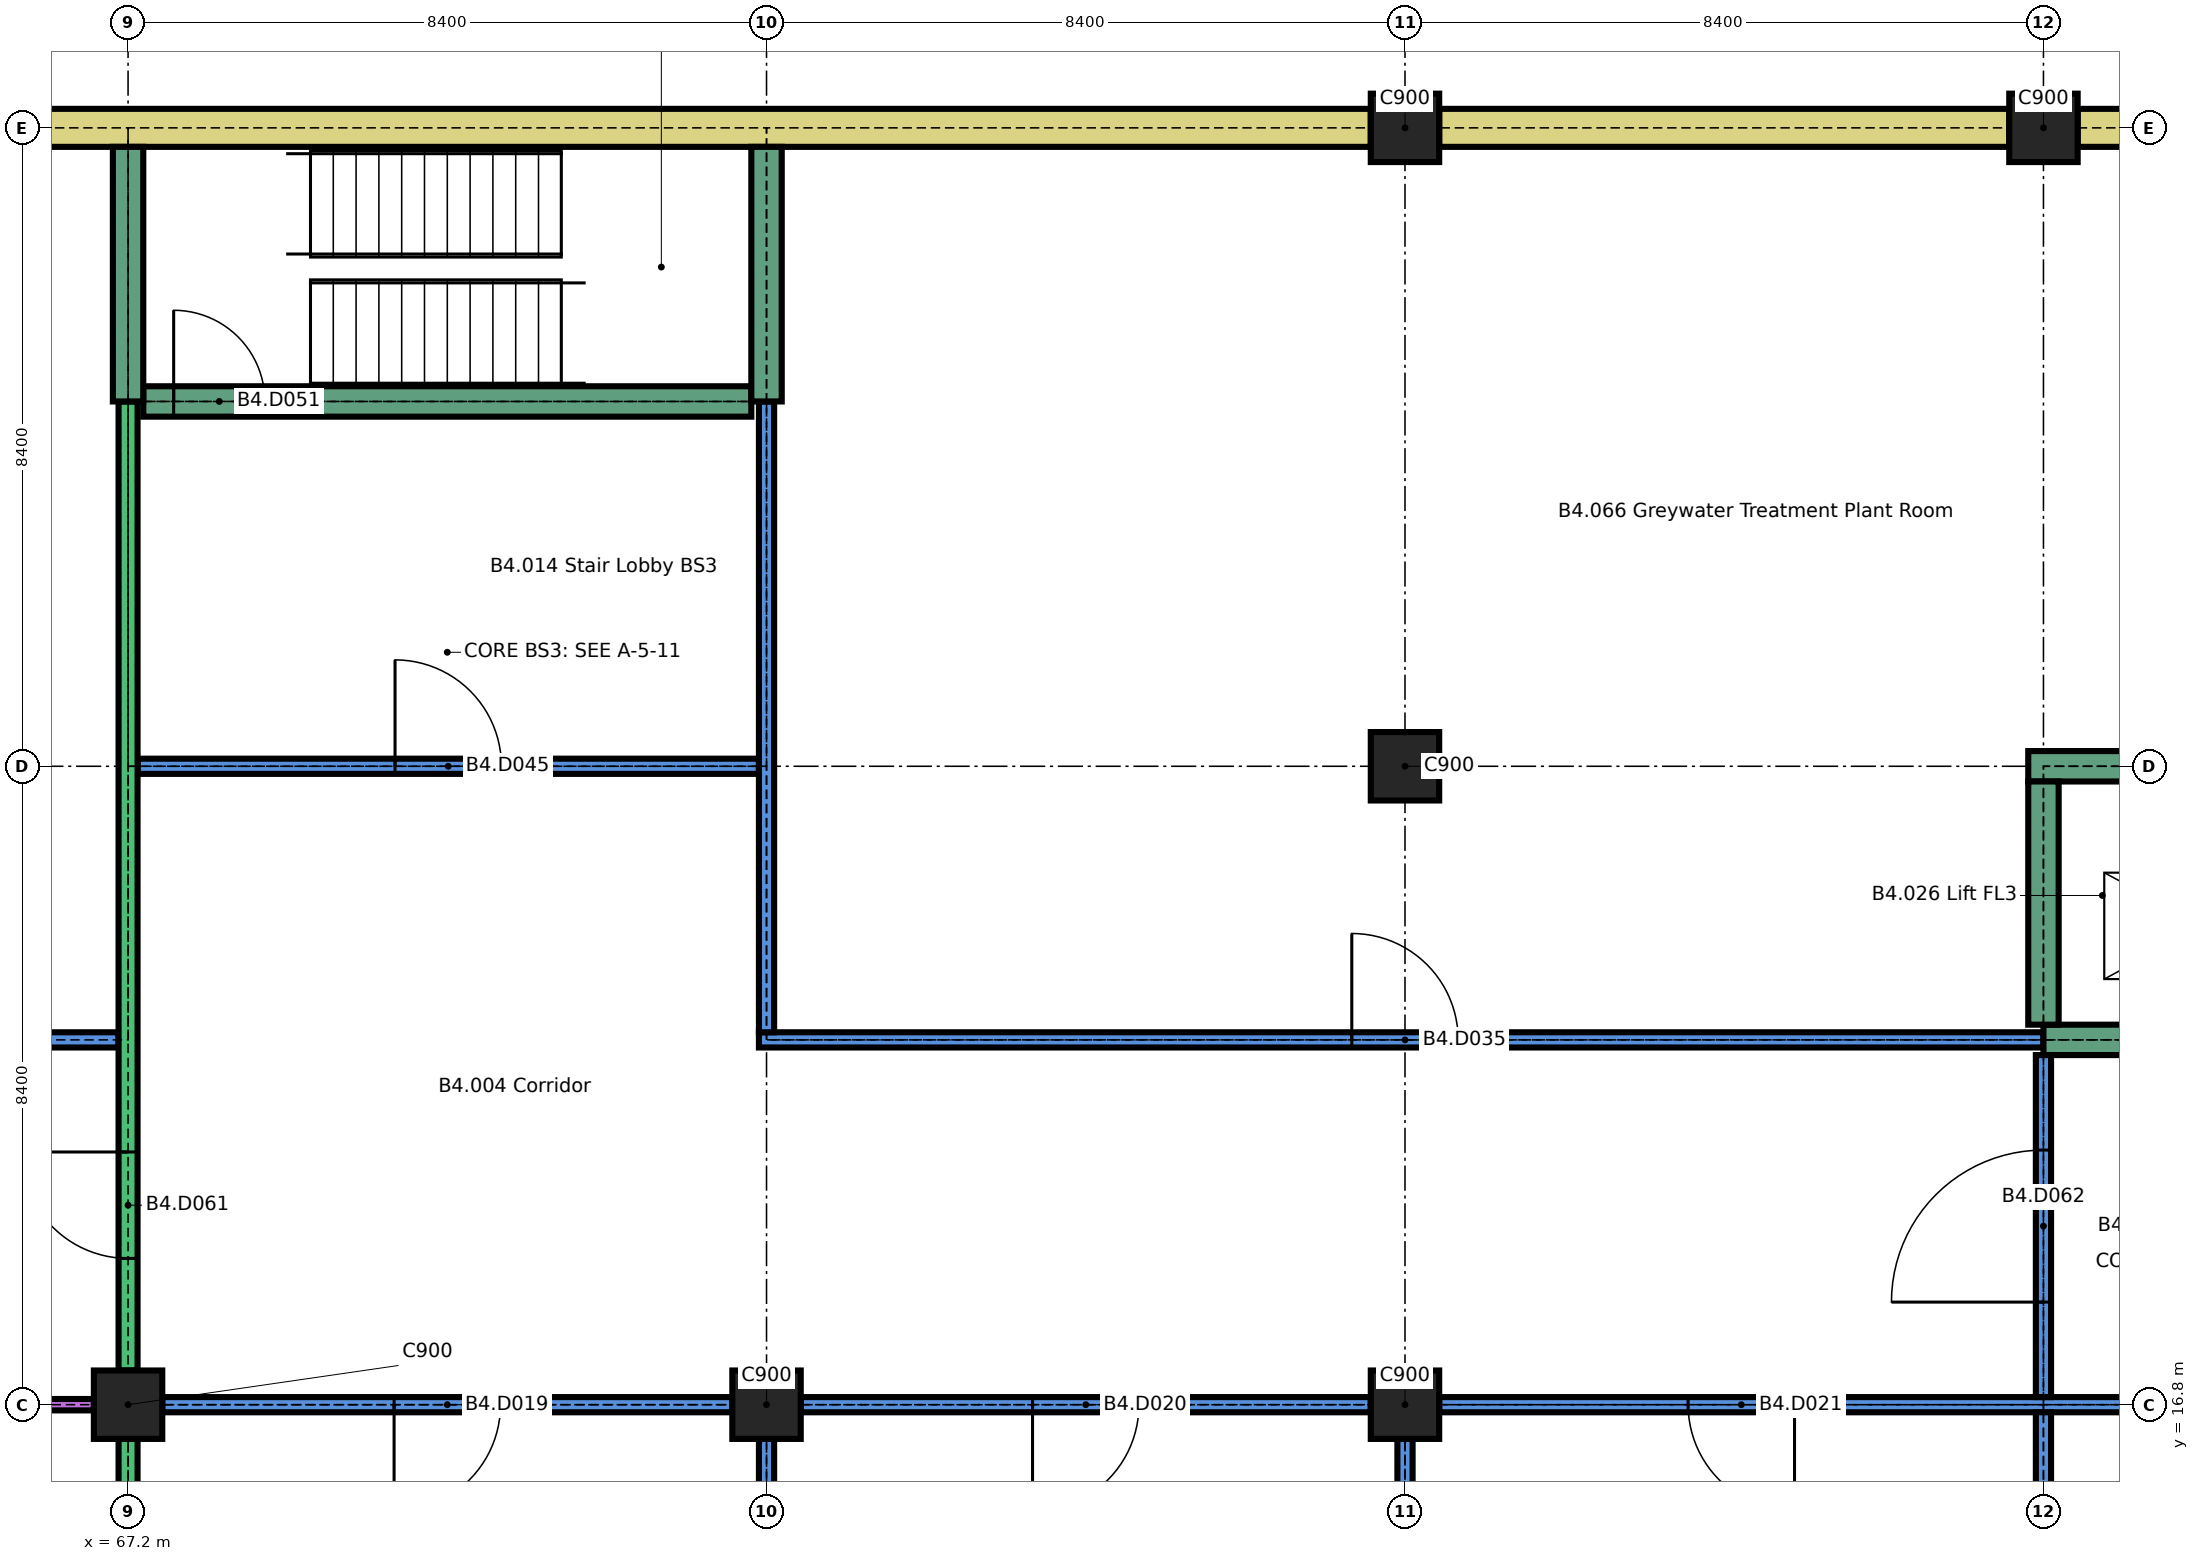
"""IFC4 building model, lengths in metres.
Left out: names, types, materials, properties, quantities, classifications, styles, units other than length and angle.
Written with IfcOpenShell. Run it as: python <this file> out.ifc"""

import sys

from ifc_helpers import new_model, si_unit, direction, frame, frame_2d, origin, origin_2d, place, context, subcontext, project, spatial, rectangle, extrude, element, fill, save


model = new_model("IFC4")
c1 = context("Model", 3, precision=1e-05, world=origin(), true_north=direction((0.0, 1.0)))
c2 = subcontext(c1, "Body", "Model", "MODEL_VIEW")
j1 = project(units=[si_unit("LENGTHUNIT", "METRE"), si_unit("PLANEANGLEUNIT", "RADIAN")], contexts=[c1])
p1 = place(None, origin())
s1 = spatial("IfcSite", under=j1, at=p1, CompositionType="ELEMENT")
p2 = place(p1, origin())
s2 = spatial("IfcBuilding", under=s1, at=p2, CompositionType="ELEMENT")
p3 = place(p2, frame((0.0, 0.0, -15.0)))
s3 = spatial("IfcBuildingStorey", under=s2, at=p3, CompositionType="ELEMENT", Elevation=-15.0)
for number, where, z_axis, x_axis in (
    (1, (67.2, 16.8, 0.0), (0.0, 0.0, 1.0), (1.0, 0.0, 0.0)),
    (2, (75.6, 16.8, 0.0), (0.0, 0.0, 1.0), (1.0, 0.0, 0.0)),
    (3, (84.0, 16.8, 0.0), (0.0, 0.0, 1.0), (1.0, 0.0, 0.0)),
    (4, (84.0, 25.2, 0.0), (0.0, 0.0, 1.0), (1.0, 0.0, 0.0)),
    (5, (84.0, 33.6, 0.0), (0.0, 0.0, 1.0), (1.0, 0.0, 0.0)),
    (6, (92.4, 33.6, 0.0), (0.0, 0.0, 1.0), (1.0, 0.0, 0.0)),
):
    element("IfcColumn", number, at=place(p3, frame(where, z_axis=z_axis, x_axis=x_axis)), inside=s3, PredefinedType="COLUMN", context=c2, shape_type="SweptSolid", body=[
        extrude(rectangle(XDim=0.9, YDim=0.9, at=origin_2d()), origin(), (0.0, 0.0, 1.0), 3.2),
    ])
p4 = place(p3, frame((42.45, 33.6, 0.0), z_axis=(0.0, 0.0, 1.0), x_axis=(1.0, 0.0, 0.0)))
e7 = element("IfcWall", 7, at=p4, inside=s3, PredefinedType="SOLIDWALL", context=c2, shape_type="SweptSolid", body=[
    extrude(rectangle(XDim=41.1, YDim=0.5, at=frame_2d((20.55, 0.0))), origin(), (0.0, 0.0, 1.0), 3.2),
])
for number, where, z_axis, x_axis in (
    (8, (84.45, 33.6, 0.0), (0.0, 0.0, 1.0), (1.0, 0.0, 0.0)),
    (9, (92.85, 33.6, 0.0), (0.0, 0.0, 1.0), (1.0, 0.0, 0.0)),
):
    element("IfcWall", number, at=place(p3, frame(where, z_axis=z_axis, x_axis=x_axis)), inside=s3, PredefinedType="SOLIDWALL", context=c2, shape_type="SweptSolid", body=[
        extrude(rectangle(XDim=7.5, YDim=0.5, at=frame_2d((3.75, 0.0))), origin(), (0.0, 0.0, 1.0), 3.2),
    ])
p5 = place(p3, frame((59.25, 16.8, 0.0), z_axis=(0.0, 0.0, 1.0), x_axis=(1.0, 0.0, 0.0)))
e10 = element("IfcWall", 10, at=p5, inside=s3, PredefinedType="PARTITIONING", context=c2, shape_type="SweptSolid", body=[
    extrude(rectangle(XDim=7.5, YDim=0.15, at=frame_2d((3.75, 0.0))), origin(), (0.0, 0.0, 1.0), 3.2),
])
p6 = place(p5, frame((3.05, 0.0, 0.0)))
e11 = element("IfcOpeningElement", 11, at=p6, cuts=e10, PredefinedType="OPENING", context=c2, shape_type="SweptSolid", body=[
    extrude(rectangle(XDim=1.4, YDim=2.1, at=frame_2d((0.7, 1.05))), frame((0.0, 0.085, 0.0), z_axis=(0.0, -1.0, 0.0), x_axis=(1.0, 0.0, 0.0)), (0.0, 0.0, 1.0), 0.17),
])
p7 = place(p3, frame((67.65, 16.8, 0.0), z_axis=(0.0, 0.0, 1.0), x_axis=(1.0, 0.0, 0.0)))
e12 = element("IfcWall", 12, at=p7, inside=s3, PredefinedType="PARTITIONING", context=c2, shape_type="SweptSolid", body=[
    extrude(rectangle(XDim=7.5, YDim=0.2, at=frame_2d((3.75, 0.0))), origin(), (0.0, 0.0, 1.0), 3.2),
])
p8 = place(p7, frame((3.05, 0.0, 0.0)))
e13 = element("IfcOpeningElement", 13, at=p8, cuts=e12, PredefinedType="OPENING", context=c2, shape_type="SweptSolid", body=[
    extrude(rectangle(XDim=1.4, YDim=2.1, at=frame_2d((0.7, 1.05))), frame((0.0, 0.11, 0.0), z_axis=(0.0, -1.0, 0.0), x_axis=(1.0, 0.0, 0.0)), (0.0, 0.0, 1.0), 0.22),
])
p9 = place(p3, frame((76.05, 16.8, 0.0), z_axis=(0.0, 0.0, 1.0), x_axis=(1.0, 0.0, 0.0)))
e14 = element("IfcWall", 14, at=p9, inside=s3, PredefinedType="PARTITIONING", context=c2, shape_type="SweptSolid", body=[
    extrude(rectangle(XDim=7.5, YDim=0.2, at=frame_2d((3.75, 0.0))), origin(), (0.0, 0.0, 1.0), 3.2),
])
p10 = place(p9, frame((3.05, 0.0, 0.0)))
e15 = element("IfcOpeningElement", 15, at=p10, cuts=e14, PredefinedType="OPENING", context=c2, shape_type="SweptSolid", body=[
    extrude(rectangle(XDim=1.4, YDim=2.1, at=frame_2d((0.7, 1.05))), frame((0.0, 0.11, 0.0), z_axis=(0.0, -1.0, 0.0), x_axis=(1.0, 0.0, 0.0)), (0.0, 0.0, 1.0), 0.22),
])
p11 = place(p3, frame((84.45, 16.8, 0.0), z_axis=(0.0, 0.0, 1.0), x_axis=(1.0, 0.0, 0.0)))
e16 = element("IfcWall", 16, at=p11, inside=s3, PredefinedType="PARTITIONING", context=c2, shape_type="SweptSolid", body=[
    extrude(rectangle(XDim=15.9, YDim=0.2, at=frame_2d((7.95, 0.0))), origin(), (0.0, 0.0, 1.0), 3.2),
])
p12 = place(p11, frame((3.275, 0.0, 0.0)))
e17 = element("IfcOpeningElement", 17, at=p12, cuts=e16, PredefinedType="OPENING", context=c2, shape_type="SweptSolid", body=[
    extrude(rectangle(XDim=1.4, YDim=2.1, at=frame_2d((0.7, 1.05))), frame((0.0, 0.11, 0.0), z_axis=(0.0, -1.0, 0.0), x_axis=(1.0, 0.0, 0.0)), (0.0, 0.0, 1.0), 0.22),
])
p13 = place(p11, frame((13.325, 0.0, 0.0)))
e18 = element("IfcOpeningElement", 18, at=p13, cuts=e16, PredefinedType="OPENING", context=c2, shape_type="SweptSolid", body=[
    extrude(rectangle(XDim=1.4, YDim=2.1, at=frame_2d((0.7, 1.05))), frame((0.0, 0.11, 0.0), z_axis=(0.0, -1.0, 0.0), x_axis=(1.0, 0.0, 0.0)), (0.0, 0.0, 1.0), 0.22),
])
p14 = place(p3, frame((58.7, 21.6, 0.0), z_axis=(0.0, 0.0, 1.0), x_axis=(1.0, 0.0, 0.0)))
e19 = element("IfcWall", 19, at=p14, inside=s3, PredefinedType="PARTITIONING", context=c2, shape_type="SweptSolid", body=[
    extrude(rectangle(XDim=8.375, YDim=0.2, at=frame_2d((4.188, 0.0))), origin(), (0.0, 0.0, 1.0), 3.2),
])
p15 = place(p14, frame((3.538, 0.0, 0.0)))
e20 = element("IfcOpeningElement", 20, at=p15, cuts=e19, PredefinedType="OPENING", context=c2, shape_type="SweptSolid", body=[
    extrude(rectangle(XDim=1.4, YDim=2.1, at=frame_2d((0.7, 1.05))), frame((0.0, 0.11, 0.0), z_axis=(0.0, -1.0, 0.0), x_axis=(1.0, 0.0, 0.0)), (0.0, 0.0, 1.0), 0.22),
])
p16 = place(p3, frame((75.5, 21.6, 0.0), z_axis=(0.0, 0.0, 1.0), x_axis=(1.0, 0.0, 0.0)))
e21 = element("IfcWall", 21, at=p16, inside=s3, PredefinedType="PARTITIONING", context=c2, shape_type="SweptSolid", body=[
    extrude(rectangle(XDim=16.9, YDim=0.2, at=frame_2d((8.45, 0.0))), origin(), (0.0, 0.0, 1.0), 3.2),
])
p17 = place(p16, frame((7.8, 0.0, 0.0)))
e22 = element("IfcOpeningElement", 22, at=p17, cuts=e21, PredefinedType="OPENING", context=c2, shape_type="SweptSolid", body=[
    extrude(rectangle(XDim=1.4, YDim=2.1, at=frame_2d((0.7, 1.05))), frame((0.0, 0.11, 0.0), z_axis=(0.0, -1.0, 0.0), x_axis=(1.0, 0.0, 0.0)), (0.0, 0.0, 1.0), 0.22),
])
p18 = place(p3, frame((92.4, 21.6, 0.0), z_axis=(0.0, 0.0, 1.0), x_axis=(1.0, 0.0, 0.0)))
e23 = element("IfcWall", 23, at=p18, inside=s3, PredefinedType="SHEAR", context=c2, shape_type="SweptSolid", body=[
    extrude(rectangle(XDim=4.2, YDim=0.4, at=frame_2d((2.1, 0.0))), origin(), (0.0, 0.0, 1.0), 3.2),
])
p19 = place(p18, frame((1.55, 0.0, 0.0)))
e24 = element("IfcOpeningElement", 24, at=p19, cuts=e23, PredefinedType="OPENING", context=c2, shape_type="SweptSolid", body=[
    extrude(rectangle(XDim=1.1, YDim=2.1, at=frame_2d((0.55, 1.05))), frame((0.0, 0.21, 0.0), z_axis=(0.0, -1.0, 0.0), x_axis=(1.0, 0.0, 0.0)), (0.0, 0.0, 1.0), 0.42),
])
p20 = place(p3, frame((67.325, 25.2, 0.0), z_axis=(0.0, 0.0, 1.0), x_axis=(1.0, 0.0, 0.0)))
e25 = element("IfcWall", 25, at=p20, inside=s3, PredefinedType="PARTITIONING", context=c2, shape_type="SweptSolid", body=[
    extrude(rectangle(XDim=8.175, YDim=0.2, at=frame_2d((4.087, 0.0))), origin(), (0.0, 0.0, 1.0), 3.2),
])
p21 = place(p20, frame((3.387, 0.0, 0.0)))
e26 = element("IfcOpeningElement", 26, at=p21, cuts=e25, PredefinedType="OPENING", context=c2, shape_type="SweptSolid", body=[
    extrude(rectangle(XDim=1.4, YDim=2.1, at=frame_2d((0.7, 1.05))), frame((0.0, 0.11, 0.0), z_axis=(0.0, -1.0, 0.0), x_axis=(1.0, 0.0, 0.0)), (0.0, 0.0, 1.0), 0.22),
])
p22 = place(p3, frame((92.2, 25.2, 0.0), z_axis=(0.0, 0.0, 1.0), x_axis=(1.0, 0.0, 0.0)))
e27 = element("IfcWall", 27, at=p22, inside=s3, PredefinedType="SHEAR", context=c2, shape_type="SweptSolid", body=[
    extrude(rectangle(XDim=4.6, YDim=0.4, at=frame_2d((2.3, 0.0))), origin(), (0.0, 0.0, 1.0), 3.2),
])
p23 = place(p3, frame((67.4, 30.0, 0.0), z_axis=(0.0, 0.0, 1.0), x_axis=(1.0, 0.0, 0.0)))
e28 = element("IfcWall", 28, at=p23, inside=s3, PredefinedType="SHEAR", context=c2, shape_type="SweptSolid", body=[
    extrude(rectangle(XDim=8.0, YDim=0.4, at=frame_2d((4.0, 0.0))), origin(), (0.0, 0.0, 1.0), 3.2),
])
p24 = place(p23, frame((0.4, 0.0, 0.0)))
e29 = element("IfcOpeningElement", 29, at=p24, cuts=e28, PredefinedType="OPENING", context=c2, shape_type="SweptSolid", body=[
    extrude(rectangle(XDim=1.2, YDim=2.1, at=frame_2d((0.6, 1.05))), frame((0.0, 0.21, 0.0), z_axis=(0.0, -1.0, 0.0), x_axis=(1.0, 0.0, 0.0)), (0.0, 0.0, 1.0), 0.42),
])
p25 = place(p3, frame((67.2, 8.85, 0.0), z_axis=(0.0, 0.0, 1.0), x_axis=(0.0, 1.0, 0.0)))
e30 = element("IfcWall", 30, at=p25, inside=s3, PredefinedType="SOLIDWALL", context=c2, shape_type="SweptSolid", body=[
    extrude(rectangle(XDim=7.5, YDim=0.25, at=frame_2d((3.75, 0.0))), origin(), (0.0, 0.0, 1.0), 3.2),
])
p26 = place(p3, frame((67.2, 17.25, 0.0), z_axis=(0.0, 0.0, 1.0), x_axis=(0.0, 1.0, 0.0)))
e31 = element("IfcWall", 31, at=p26, inside=s3, PredefinedType="SOLIDWALL", context=c2, shape_type="SweptSolid", body=[
    extrude(rectangle(XDim=12.75, YDim=0.25, at=frame_2d((6.375, 0.0))), origin(), (0.0, 0.0, 1.0), 3.2),
])
p27 = place(p26, frame((1.475, 0.0, 0.0)))
e32 = element("IfcOpeningElement", 32, at=p27, cuts=e31, PredefinedType="OPENING", context=c2, shape_type="SweptSolid", body=[
    extrude(rectangle(XDim=1.4, YDim=2.1, at=frame_2d((0.7, 1.05))), frame((0.0, 0.135, 0.0), z_axis=(0.0, -1.0, 0.0), x_axis=(1.0, 0.0, 0.0)), (0.0, 0.0, 1.0), 0.27),
])
p28 = place(p3, frame((67.2, 30.0, 0.0), z_axis=(0.0, 0.0, 1.0), x_axis=(0.0, 1.0, 0.0)))
e33 = element("IfcWall", 33, at=p28, inside=s3, PredefinedType="SHEAR", context=c2, shape_type="SweptSolid", body=[
    extrude(rectangle(XDim=3.35, YDim=0.4, at=frame_2d((1.675, 0.0))), origin(), (0.0, 0.0, 1.0), 3.2),
])
p29 = place(p3, frame((75.6, 8.85, 0.0), z_axis=(0.0, 0.0, 1.0), x_axis=(0.0, 1.0, 0.0)))
e34 = element("IfcWall", 34, at=p29, inside=s3, PredefinedType="PARTITIONING", context=c2, shape_type="SweptSolid", body=[
    extrude(rectangle(XDim=7.5, YDim=0.2, at=frame_2d((3.75, 0.0))), origin(), (0.0, 0.0, 1.0), 3.2),
])
p30 = place(p3, frame((75.6, 21.7, 0.0), z_axis=(0.0, 0.0, 1.0), x_axis=(0.0, 1.0, 0.0)))
e35 = element("IfcWall", 35, at=p30, inside=s3, PredefinedType="PARTITIONING", context=c2, shape_type="SweptSolid", body=[
    extrude(rectangle(XDim=8.3, YDim=0.2, at=frame_2d((4.15, 0.0))), origin(), (0.0, 0.0, 1.0), 3.2),
])
p31 = place(p3, frame((75.6, 30.0, 0.0), z_axis=(0.0, 0.0, 1.0), x_axis=(0.0, 1.0, 0.0)))
e36 = element("IfcWall", 36, at=p31, inside=s3, PredefinedType="SHEAR", context=c2, shape_type="SweptSolid", body=[
    extrude(rectangle(XDim=3.35, YDim=0.4, at=frame_2d((1.675, 0.0))), origin(), (0.0, 0.0, 1.0), 3.2),
])
p32 = place(p3, frame((84.0, 8.85, 0.0), z_axis=(0.0, 0.0, 1.0), x_axis=(0.0, 1.0, 0.0)))
e37 = element("IfcWall", 37, at=p32, inside=s3, PredefinedType="PARTITIONING", context=c2, shape_type="SweptSolid", body=[
    extrude(rectangle(XDim=7.5, YDim=0.2, at=frame_2d((3.75, 0.0))), origin(), (0.0, 0.0, 1.0), 3.2),
])
p33 = place(p3, frame((92.4, 8.85, 0.0), z_axis=(0.0, 0.0, 1.0), x_axis=(0.0, 1.0, 0.0)))
e38 = element("IfcWall", 38, at=p33, inside=s3, PredefinedType="PARTITIONING", context=c2, shape_type="SweptSolid", body=[
    extrude(rectangle(XDim=7.85, YDim=0.2, at=frame_2d((3.925, 0.0))), origin(), (0.0, 0.0, 1.0), 3.2),
])
p34 = place(p3, frame((92.4, 16.9, 0.0), z_axis=(0.0, 0.0, 1.0), x_axis=(0.0, 1.0, 0.0)))
e39 = element("IfcWall", 39, at=p34, inside=s3, PredefinedType="PARTITIONING", context=c2, shape_type="SweptSolid", body=[
    extrude(rectangle(XDim=4.5, YDim=0.2, at=frame_2d((2.25, 0.0))), origin(), (0.0, 0.0, 1.0), 3.2),
])
p35 = place(p34, frame((1.25, 0.0, 0.0)))
e40 = element("IfcOpeningElement", 40, at=p35, cuts=e39, PredefinedType="OPENING", context=c2, shape_type="SweptSolid", body=[
    extrude(rectangle(XDim=2.0, YDim=2.4, at=frame_2d((1.0, 1.2))), frame((0.0, 0.11, 0.0), z_axis=(0.0, -1.0, 0.0), x_axis=(1.0, 0.0, 0.0)), (0.0, 0.0, 1.0), 0.22),
])
p36 = place(p3, frame((92.4, 21.8, 0.0), z_axis=(0.0, 0.0, 1.0), x_axis=(0.0, 1.0, 0.0)))
e41 = element("IfcWall", 41, at=p36, inside=s3, PredefinedType="SHEAR", context=c2, shape_type="SweptSolid", body=[
    extrude(rectangle(XDim=3.2, YDim=0.4, at=frame_2d((1.6, 0.0))), origin(), (0.0, 0.0, 1.0), 3.2),
])
p37 = place(p8, origin())
e42 = element("IfcDoor", 42, at=p37, inside=s3, OperationType="SINGLE_SWING_LEFT", PredefinedType="DOOR", context=c2, shape_type="SweptSolid", body=[
    extrude(rectangle(XDim=1.4, YDim=2.1, at=frame_2d((0.7, 1.05))), frame((0.0, 0.025, 0.0), z_axis=(0.0, -1.0, 0.0), x_axis=(1.0, 0.0, 0.0)), (0.0, 0.0, 1.0), 0.05),
])
fill(e13, e42)
p38 = place(p10, origin())
e43 = element("IfcDoor", 43, at=p38, inside=s3, OperationType="SINGLE_SWING_LEFT", PredefinedType="DOOR", context=c2, shape_type="SweptSolid", body=[
    extrude(rectangle(XDim=1.4, YDim=2.1, at=frame_2d((0.7, 1.05))), frame((0.0, 0.025, 0.0), z_axis=(0.0, -1.0, 0.0), x_axis=(1.0, 0.0, 0.0)), (0.0, 0.0, 1.0), 0.05),
])
fill(e15, e43)
p39 = place(p12, origin())
e44 = element("IfcDoor", 44, at=p39, inside=s3, OperationType="SINGLE_SWING_RIGHT", PredefinedType="DOOR", context=c2, shape_type="SweptSolid", body=[
    extrude(rectangle(XDim=1.4, YDim=2.1, at=frame_2d((0.7, 1.05))), frame((0.0, 0.025, 0.0), z_axis=(0.0, -1.0, 0.0), x_axis=(1.0, 0.0, 0.0)), (0.0, 0.0, 1.0), 0.05),
])
fill(e17, e44)
p40 = place(p17, origin())
e45 = element("IfcDoor", 45, at=p40, inside=s3, OperationType="SINGLE_SWING_RIGHT", PredefinedType="DOOR", context=c2, shape_type="SweptSolid", body=[
    extrude(rectangle(XDim=1.4, YDim=2.1, at=frame_2d((0.7, 1.05))), frame((0.0, 0.025, 0.0), z_axis=(0.0, -1.0, 0.0), x_axis=(1.0, 0.0, 0.0)), (0.0, 0.0, 1.0), 0.05),
])
fill(e22, e45)
p41 = place(p21, origin())
e46 = element("IfcDoor", 46, at=p41, inside=s3, OperationType="SINGLE_SWING_RIGHT", PredefinedType="DOOR", context=c2, shape_type="SweptSolid", body=[
    extrude(rectangle(XDim=1.4, YDim=2.1, at=frame_2d((0.7, 1.05))), frame((0.0, 0.03, 0.0), z_axis=(0.0, -1.0, 0.0), x_axis=(1.0, 0.0, 0.0)), (0.0, 0.0, 1.0), 0.06),
])
fill(e26, e46)
p42 = place(p24, origin())
e47 = element("IfcDoor", 47, at=p42, inside=s3, OperationType="SINGLE_SWING_RIGHT", PredefinedType="DOOR", context=c2, shape_type="SweptSolid", body=[
    extrude(rectangle(XDim=1.2, YDim=2.1, at=frame_2d((0.6, 1.05))), frame((0.0, 0.025, 0.0), z_axis=(0.0, -1.0, 0.0), x_axis=(1.0, 0.0, 0.0)), (0.0, 0.0, 1.0), 0.05),
])
fill(e29, e47)
p43 = place(p27, origin())
e48 = element("IfcDoor", 48, at=p43, inside=s3, OperationType="SINGLE_SWING_LEFT", PredefinedType="DOOR", context=c2, shape_type="SweptSolid", body=[
    extrude(rectangle(XDim=1.4, YDim=2.1, at=frame_2d((0.7, 1.05))), frame((0.0, 0.03, 0.0), z_axis=(0.0, -1.0, 0.0), x_axis=(1.0, 0.0, 0.0)), (0.0, 0.0, 1.0), 0.06),
])
fill(e32, e48)
p44 = place(p35, origin())
e49 = element("IfcDoor", 49, at=p44, inside=s3, OperationType="SINGLE_SWING_RIGHT", PredefinedType="DOOR", context=c2, shape_type="SweptSolid", body=[
    extrude(rectangle(XDim=2.0, YDim=2.4, at=frame_2d((1.0, 1.2))), frame((0.0, 0.03, 0.0), z_axis=(0.0, -1.0, 0.0), x_axis=(1.0, 0.0, 0.0)), (0.0, 0.0, 1.0), 0.06),
])
fill(e40, e49)
save(model, sys.argv[1])
